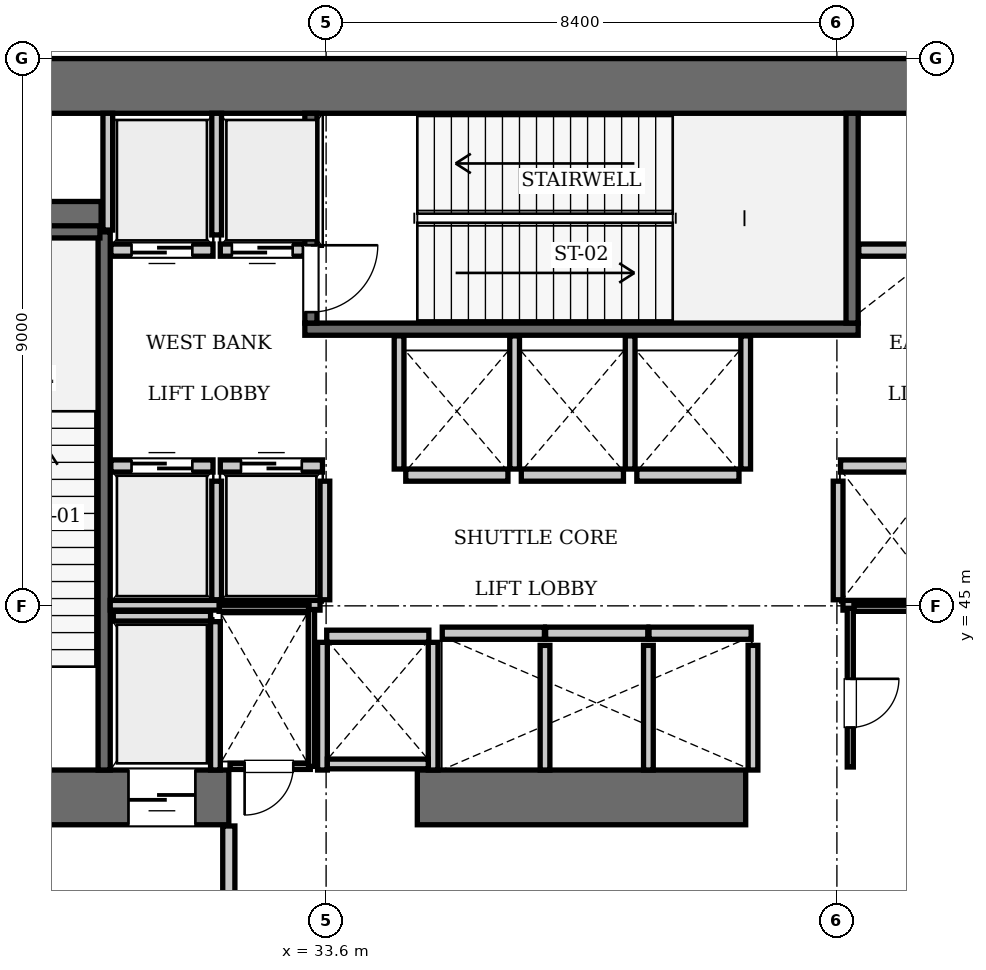
"""IFC4 building model, lengths in metres.
Left out: names, types, materials, properties, quantities, classifications, styles, units other than length and angle.
Written with IfcOpenShell. Run it as: python <this file> out.ifc"""

import sys

from ifc_helpers import new_model, si_unit, direction, frame, frame_2d, origin, place, context, subcontext, project, spatial, rectangle, extrude, element, fill, save


model = new_model("IFC4")
c1 = context("Model", 3, precision=1e-05, world=origin(), true_north=direction((0.0, 1.0)))
c2 = subcontext(c1, "Body", "Model", "MODEL_VIEW")
j1 = project(units=[si_unit("LENGTHUNIT", "METRE"), si_unit("PLANEANGLEUNIT", "RADIAN")], contexts=[c1])
p1 = place(None, origin())
s1 = spatial("IfcSite", under=j1, at=p1, CompositionType="ELEMENT")
p2 = place(p1, origin())
s2 = spatial("IfcBuilding", under=s1, at=p2, CompositionType="ELEMENT")
p3 = place(p2, frame((0.0, 0.0, 21.35)))
s3 = spatial("IfcBuildingStorey", under=s2, at=p3, CompositionType="ELEMENT", Elevation=21.35)
p4 = place(p3, frame((25.2, 53.55, 0.0), z_axis=(0.0, 0.0, 1.0), x_axis=(1.0, 0.0, 0.0)))
e1 = element("IfcWall", 1, at=p4, inside=s3, PredefinedType="SHEAR", context=c2, shape_type="SweptSolid", body=[
    extrude(rectangle(XDim=25.2, YDim=0.9, at=frame_2d((12.6, 0.0))), origin(), (0.0, 0.0, 1.0), 5.6),
])
p5 = place(p3, frame((25.2, 41.85, 0.0), z_axis=(0.0, 0.0, 1.0), x_axis=(1.0, 0.0, 0.0)))
e2 = element("IfcWall", 2, at=p5, inside=s3, PredefinedType="SHEAR", context=c2, shape_type="SweptSolid", body=[
    extrude(rectangle(XDim=6.8, YDim=0.9, at=frame_2d((3.4, 0.0))), origin(), (0.0, 0.0, 1.0), 5.6),
])
p6 = place(p5, frame((1.65, 0.0, 0.0)))
e3 = element("IfcOpeningElement", 3, at=p6, cuts=e2, PredefinedType="OPENING", context=c2, shape_type="SweptSolid", body=[
    extrude(rectangle(XDim=1.15, YDim=2.15, at=frame_2d((0.575, 1.075))), frame((0.0, 0.46, 0.0), z_axis=(0.0, -1.0, 0.0), x_axis=(1.0, 0.0, 0.0)), (0.0, 0.0, 1.0), 0.92),
])
p7 = place(p5, frame((5.15, 0.0, 0.0)))
e4 = element("IfcOpeningElement", 4, at=p7, cuts=e2, PredefinedType="OPENING", context=c2, shape_type="SweptSolid", body=[
    extrude(rectangle(XDim=1.1, YDim=2.2, at=frame_2d((0.55, 1.1))), frame((0.0, 0.46, 0.0), z_axis=(0.0, -1.0, 0.0), x_axis=(1.0, 0.0, 0.0)), (0.0, 0.0, 1.0), 0.92),
])
p8 = place(p3, frame((35.1, 41.85, 0.0), z_axis=(0.0, 0.0, 1.0), x_axis=(1.0, 0.0, 0.0)))
e5 = element("IfcWall", 5, at=p8, inside=s3, PredefinedType="SHEAR", context=c2, shape_type="SweptSolid", body=[
    extrude(rectangle(XDim=5.4, YDim=0.9, at=frame_2d((2.7, 0.0))), origin(), (0.0, 0.0, 1.0), 5.6),
])
p9 = place(p3, frame((26.1, 51.4, 0.0), z_axis=(0.0, 0.0, 1.0), x_axis=(1.0, 0.0, 0.0)))
e6 = element("IfcWall", 6, at=p9, inside=s3, PredefinedType="SHEAR", context=c2, shape_type="SweptSolid", body=[
    extrude(rectangle(XDim=3.8, YDim=0.5, at=frame_2d((1.9, 0.0))), origin(), (0.0, 0.0, 1.0), 5.6),
])
p10 = place(p3, frame((29.95, 42.3, 0.0), z_axis=(0.0, 0.0, 1.0), x_axis=(0.0, 1.0, 0.0)))
e7 = element("IfcWall", 7, at=p10, inside=s3, PredefinedType="SOLIDWALL", context=c2, shape_type="SweptSolid", body=[
    extrude(rectangle(XDim=8.85, YDim=0.2, at=frame_2d((4.425, 0.0))), origin(), (0.0, 0.0, 1.0), 5.36),
])
p11 = place(p3, frame((26.38, 51.15, 0.0), z_axis=(0.0, 0.0, 1.0), x_axis=(1.0, 0.0, 0.0)))
e8 = element("IfcWall", 8, at=p11, inside=s3, PredefinedType="SOLIDWALL", context=c2, shape_type="SweptSolid", body=[
    extrude(rectangle(XDim=3.5, YDim=0.2, at=frame_2d((1.75, 0.0))), origin(), (0.0, 0.0, 1.0), 5.36),
])
p12 = place(p3, frame((33.25, 49.55, 0.0), z_axis=(0.0, 0.0, 1.0), x_axis=(1.0, 0.0, 0.0)))
e9 = element("IfcWall", 9, at=p12, inside=s3, PredefinedType="SOLIDWALL", context=c2, shape_type="SweptSolid", body=[
    extrude(rectangle(XDim=9.1, YDim=0.2, at=frame_2d((4.55, 0.0))), origin(), (0.0, 0.0, 1.0), 5.36),
])
p13 = place(p3, frame((42.25, 49.65, 0.0), z_axis=(0.0, 0.0, 1.0), x_axis=(0.0, 1.0, 0.0)))
e10 = element("IfcWall", 10, at=p13, inside=s3, PredefinedType="SOLIDWALL", context=c2, shape_type="SweptSolid", body=[
    extrude(rectangle(XDim=3.45, YDim=0.2, at=frame_2d((1.725, 0.0))), origin(), (0.0, 0.0, 1.0), 5.36),
])
p14 = place(p3, frame((33.35, 49.65, 0.0), z_axis=(0.0, 0.0, 1.0), x_axis=(0.0, 1.0, 0.0)))
e11 = element("IfcWall", 11, at=p14, inside=s3, PredefinedType="SOLIDWALL", context=c2, shape_type="SweptSolid", body=[
    extrude(rectangle(XDim=3.45, YDim=0.2, at=frame_2d((1.725, 0.0))), origin(), (0.0, 0.0, 1.0), 5.36),
])
p15 = place(p14, frame((0.18, 0.0, 0.0)))
e12 = element("IfcOpeningElement", 12, at=p15, cuts=e11, PredefinedType="OPENING", context=c2, shape_type="SweptSolid", body=[
    extrude(rectangle(XDim=1.1, YDim=2.15, at=frame_2d((0.55, 1.075))), frame((0.0, 0.11, 0.0), z_axis=(0.0, -1.0, 0.0), x_axis=(1.0, 0.0, 0.0)), (0.0, 0.0, 1.0), 0.22),
])
p16 = place(p3, frame((30.06, 47.3, 0.0), z_axis=(0.0, 0.0, 1.0), x_axis=(1.0, 0.0, 0.0)))
e13 = element("IfcWall", 13, at=p16, inside=s3, PredefinedType="SOLIDWALL", context=c2, shape_type="SweptSolid", body=[
    extrude(rectangle(XDim=1.68, YDim=0.2, at=frame_2d((0.84, 0.0))), origin(), (0.0, 0.0, 1.0), 5.36),
])
p17 = place(p16, frame((0.34, 0.0, 0.0)))
e14 = element("IfcOpeningElement", 14, at=p17, cuts=e13, PredefinedType="OPENING", context=c2, shape_type="SweptSolid", body=[
    extrude(rectangle(XDim=1.0, YDim=2.15, at=frame_2d((0.5, 1.075))), frame((0.0, 0.11, 0.0), z_axis=(0.0, -1.0, 0.0), x_axis=(1.0, 0.0, 0.0)), (0.0, 0.0, 1.0), 0.22),
])
p18 = place(p3, frame((31.86, 47.3, 0.0), z_axis=(0.0, 0.0, 1.0), x_axis=(1.0, 0.0, 0.0)))
e15 = element("IfcWall", 15, at=p18, inside=s3, PredefinedType="SOLIDWALL", context=c2, shape_type="SweptSolid", body=[
    extrude(rectangle(XDim=1.68, YDim=0.2, at=frame_2d((0.84, 0.0))), origin(), (0.0, 0.0, 1.0), 5.36),
])
p19 = place(p18, frame((0.34, 0.0, 0.0)))
e16 = element("IfcOpeningElement", 16, at=p19, cuts=e15, PredefinedType="OPENING", context=c2, shape_type="SweptSolid", body=[
    extrude(rectangle(XDim=1.0, YDim=2.15, at=frame_2d((0.5, 1.075))), frame((0.0, 0.11, 0.0), z_axis=(0.0, -1.0, 0.0), x_axis=(1.0, 0.0, 0.0)), (0.0, 0.0, 1.0), 0.22),
])
p20 = place(p3, frame((30.06, 50.85, 0.0), z_axis=(0.0, 0.0, 1.0), x_axis=(1.0, 0.0, 0.0)))
e17 = element("IfcWall", 17, at=p20, inside=s3, PredefinedType="SOLIDWALL", context=c2, shape_type="SweptSolid", body=[
    extrude(rectangle(XDim=1.68, YDim=0.2, at=frame_2d((0.84, 0.0))), origin(), (0.0, 0.0, 1.0), 5.36),
])
p21 = place(p20, frame((0.34, 0.0, 0.0)))
e18 = element("IfcOpeningElement", 18, at=p21, cuts=e17, PredefinedType="OPENING", context=c2, shape_type="SweptSolid", body=[
    extrude(rectangle(XDim=1.0, YDim=2.15, at=frame_2d((0.5, 1.075))), frame((0.0, 0.11, 0.0), z_axis=(0.0, -1.0, 0.0), x_axis=(1.0, 0.0, 0.0)), (0.0, 0.0, 1.0), 0.22),
])
p22 = place(p3, frame((31.86, 50.85, 0.0), z_axis=(0.0, 0.0, 1.0), x_axis=(1.0, 0.0, 0.0)))
e19 = element("IfcWall", 19, at=p22, inside=s3, PredefinedType="SOLIDWALL", context=c2, shape_type="SweptSolid", body=[
    extrude(rectangle(XDim=1.38, YDim=0.2, at=frame_2d((0.69, 0.0))), origin(), (0.0, 0.0, 1.0), 5.36),
])
p23 = place(p22, frame((0.19, 0.0, 0.0)))
e20 = element("IfcOpeningElement", 20, at=p23, cuts=e19, PredefinedType="OPENING", context=c2, shape_type="SweptSolid", body=[
    extrude(rectangle(XDim=1.0, YDim=2.15, at=frame_2d((0.5, 1.075))), frame((0.0, 0.11, 0.0), z_axis=(0.0, -1.0, 0.0), x_axis=(1.0, 0.0, 0.0)), (0.0, 0.0, 1.0), 0.22),
])
p24 = place(p3, frame((42.06, 47.3, 0.0), z_axis=(0.0, 0.0, 1.0), x_axis=(1.0, 0.0, 0.0)))
e21 = element("IfcWall", 21, at=p24, inside=s3, PredefinedType="SOLIDWALL", context=c2, shape_type="SweptSolid", body=[
    extrude(rectangle(XDim=1.68, YDim=0.2, at=frame_2d((0.84, 0.0))), origin(), (0.0, 0.0, 1.0), 5.36),
])
p25 = place(p3, frame((42.36, 50.85, 0.0), z_axis=(0.0, 0.0, 1.0), x_axis=(1.0, 0.0, 0.0)))
e22 = element("IfcWall", 22, at=p25, inside=s3, PredefinedType="SOLIDWALL", context=c2, shape_type="SweptSolid", body=[
    extrude(rectangle(XDim=1.38, YDim=0.2, at=frame_2d((0.69, 0.0))), origin(), (0.0, 0.0, 1.0), 5.36),
])
for number, where, z_axis, x_axis in (
    (23, (35.51, 44.55, 0.0), (0.0, 0.0, 1.0), (1.0, 0.0, 0.0)),
    (24, (37.21, 44.55, 0.0), (0.0, 0.0, 1.0), (1.0, 0.0, 0.0)),
):
    element("IfcWall", number, at=place(p3, frame(where, z_axis=z_axis, x_axis=x_axis)), inside=s3, PredefinedType="SOLIDWALL", context=c2, shape_type="SweptSolid", body=[
        extrude(rectangle(XDim=1.68, YDim=0.2, at=frame_2d((0.84, 0.0))), origin(), (0.0, 0.0, 1.0), 5.36),
    ])
for number, where, z_axis, x_axis in (
    (25, (38.91, 44.55, 0.0), (0.0, 0.0, 1.0), (1.0, 0.0, 0.0)),
    (26, (34.91, 47.15, 0.0), (0.0, 0.0, 1.0), (1.0, 0.0, 0.0)),
):
    element("IfcWall", number, at=place(p3, frame(where, z_axis=z_axis, x_axis=x_axis)), inside=s3, PredefinedType="SOLIDWALL", context=c2, shape_type="SweptSolid", body=[
        extrude(rectangle(XDim=1.68, YDim=0.2, at=frame_2d((0.84, 0.0))), origin(), (0.0, 0.0, 1.0), 5.36),
    ])
for number, where, z_axis, x_axis in (
    (27, (36.81, 47.15, 0.0), (0.0, 0.0, 1.0), (1.0, 0.0, 0.0)),
    (28, (38.71, 47.15, 0.0), (0.0, 0.0, 1.0), (1.0, 0.0, 0.0)),
    (29, (33.61, 44.5, 0.0), (0.0, 0.0, 1.0), (1.0, 0.0, 0.0)),
):
    element("IfcWall", number, at=place(p3, frame(where, z_axis=z_axis, x_axis=x_axis)), inside=s3, PredefinedType="SOLIDWALL", context=c2, shape_type="SweptSolid", body=[
        extrude(rectangle(XDim=1.68, YDim=0.2, at=frame_2d((0.84, 0.0))), origin(), (0.0, 0.0, 1.0), 5.36),
    ])
p26 = place(p3, frame((30.1, 44.83, 0.0), z_axis=(0.0, 0.0, 1.0), x_axis=(1.0, 0.0, 0.0)))
e30 = element("IfcWall", 30, at=p26, inside=s3, PredefinedType="SOLIDWALL", context=c2, shape_type="SweptSolid", body=[
    extrude(rectangle(XDim=1.6, YDim=0.16, at=frame_2d((0.8, 0.0))), origin(), (0.0, 0.0, 1.0), 5.36),
])
p27 = place(p3, frame((31.78, 42.3, 0.0), z_axis=(0.0, 0.0, 1.0), x_axis=(0.0, 1.0, 0.0)))
e31 = element("IfcWall", 31, at=p27, inside=s3, PredefinedType="SOLIDWALL", context=c2, shape_type="SweptSolid", body=[
    extrude(rectangle(XDim=2.44, YDim=0.16, at=frame_2d((1.22, 0.0))), origin(), (0.0, 0.0, 1.0), 5.36),
])
for number, where, z_axis, x_axis in (
    (32, (31.8, 45.1, 0.0), (0.0, 0.0, 1.0), (0.0, 1.0, 0.0)),
    (33, (33.58, 45.1, 0.0), (0.0, 0.0, 1.0), (0.0, 1.0, 0.0)),
):
    element("IfcWall", number, at=place(p3, frame(where, z_axis=z_axis, x_axis=x_axis)), inside=s3, PredefinedType="SOLIDWALL", context=c2, shape_type="SweptSolid", body=[
        extrude(rectangle(XDim=1.95, YDim=0.16, at=frame_2d((0.975, 0.0))), origin(), (0.0, 0.0, 1.0), 5.36),
    ])
p28 = place(p3, frame((30.05, 45.01, 0.0), z_axis=(0.0, 0.0, 1.0), x_axis=(1.0, 0.0, 0.0)))
e34 = element("IfcWall", 34, at=p28, inside=s3, PredefinedType="SOLIDWALL", context=c2, shape_type="SweptSolid", body=[
    extrude(rectangle(XDim=3.45, YDim=0.16, at=frame_2d((1.725, 0.0))), origin(), (0.0, 0.0, 1.0), 5.36),
])
p29 = place(p3, frame((30.01, 51.18, 0.0), z_axis=(0.0, 0.0, 1.0), x_axis=(0.0, 1.0, 0.0)))
e35 = element("IfcWall", 35, at=p29, inside=s3, PredefinedType="SOLIDWALL", context=c2, shape_type="SweptSolid", body=[
    extrude(rectangle(XDim=1.92, YDim=0.16, at=frame_2d((0.96, 0.0))), origin(), (0.0, 0.0, 1.0), 5.36),
])
p30 = place(p3, frame((31.8, 51.1, 0.0), z_axis=(0.0, 0.0, 1.0), x_axis=(0.0, 1.0, 0.0)))
e36 = element("IfcWall", 36, at=p30, inside=s3, PredefinedType="SOLIDWALL", context=c2, shape_type="SweptSolid", body=[
    extrude(rectangle(XDim=2.0, YDim=0.16, at=frame_2d((1.0, 0.0))), origin(), (0.0, 0.0, 1.0), 5.36),
])
p31 = place(p3, frame((42.02, 45.1, 0.0), z_axis=(0.0, 0.0, 1.0), x_axis=(0.0, 1.0, 0.0)))
e37 = element("IfcWall", 37, at=p31, inside=s3, PredefinedType="SOLIDWALL", context=c2, shape_type="SweptSolid", body=[
    extrude(rectangle(XDim=1.95, YDim=0.16, at=frame_2d((0.975, 0.0))), origin(), (0.0, 0.0, 1.0), 5.36),
])
p32 = place(p3, frame((42.1, 45.01, 0.0), z_axis=(0.0, 0.0, 1.0), x_axis=(1.0, 0.0, 0.0)))
e38 = element("IfcWall", 38, at=p32, inside=s3, PredefinedType="SOLIDWALL", context=c2, shape_type="SweptSolid", body=[
    extrude(rectangle(XDim=3.45, YDim=0.16, at=frame_2d((1.725, 0.0))), origin(), (0.0, 0.0, 1.0), 5.36),
])
for number, where, z_axis, x_axis in (
    (39, (37.2, 42.3, 0.0), (0.0, 0.0, 1.0), (0.0, 1.0, 0.0)),
    (40, (38.9, 42.3, 0.0), (0.0, 0.0, 1.0), (0.0, 1.0, 0.0)),
    (41, (40.62, 42.3, 0.0), (0.0, 0.0, 1.0), (0.0, 1.0, 0.0)),
):
    element("IfcWall", number, at=place(p3, frame(where, z_axis=z_axis, x_axis=x_axis)), inside=s3, PredefinedType="SOLIDWALL", context=c2, shape_type="SweptSolid", body=[
        extrude(rectangle(XDim=2.05, YDim=0.16, at=frame_2d((1.025, 0.0))), origin(), (0.0, 0.0, 1.0), 5.36),
    ])
for number, where, z_axis, x_axis in (
    (42, (34.8, 47.25, 0.0), (0.0, 0.0, 1.0), (0.0, 1.0, 0.0)),
    (43, (36.7, 47.25, 0.0), (0.0, 0.0, 1.0), (0.0, 1.0, 0.0)),
    (44, (38.6, 47.25, 0.0), (0.0, 0.0, 1.0), (0.0, 1.0, 0.0)),
    (45, (40.5, 47.25, 0.0), (0.0, 0.0, 1.0), (0.0, 1.0, 0.0)),
):
    element("IfcWall", number, at=place(p3, frame(where, z_axis=z_axis, x_axis=x_axis)), inside=s3, PredefinedType="SOLIDWALL", context=c2, shape_type="SweptSolid", body=[
        extrude(rectangle(XDim=2.19, YDim=0.16, at=frame_2d((1.095, 0.0))), origin(), (0.0, 0.0, 1.0), 5.36),
    ])
for number, where, z_axis, x_axis in (
    (46, (33.54, 42.3, 0.0), (0.0, 0.0, 1.0), (0.0, 1.0, 0.0)),
    (47, (35.36, 42.3, 0.0), (0.0, 0.0, 1.0), (0.0, 1.0, 0.0)),
):
    element("IfcWall", number, at=place(p3, frame(where, z_axis=z_axis, x_axis=x_axis)), inside=s3, PredefinedType="SOLIDWALL", context=c2, shape_type="SweptSolid", body=[
        extrude(rectangle(XDim=2.1, YDim=0.16, at=frame_2d((1.05, 0.0))), origin(), (0.0, 0.0, 1.0), 5.36),
    ])
p33 = place(p3, frame((33.62, 42.4, 0.0), z_axis=(0.0, 0.0, 1.0), x_axis=(1.0, 0.0, 0.0)))
e48 = element("IfcWall", 48, at=p33, inside=s3, PredefinedType="SOLIDWALL", context=c2, shape_type="SweptSolid", body=[
    extrude(rectangle(XDim=1.66, YDim=0.16, at=frame_2d((0.83, 0.0))), origin(), (0.0, 0.0, 1.0), 5.36),
])
p34 = place(p3, frame((32.0, 38.31, 0.0), z_axis=(0.0, 0.0, 1.0), x_axis=(0.0, 1.0, 0.0)))
e49 = element("IfcWall", 49, at=p34, inside=s3, PredefinedType="PARTITIONING", context=c2, shape_type="SweptSolid", body=[
    extrude(rectangle(XDim=3.07, YDim=0.2, at=frame_2d((1.535, 0.0))), origin(), (0.0, 0.0, 1.0), 5.36),
])
p35 = place(p3, frame((32.02, 42.36, 0.0), z_axis=(0.0, 0.0, 1.0), x_axis=(1.0, 0.0, 0.0)))
e50 = element("IfcWall", 50, at=p35, inside=s3, PredefinedType="PARTITIONING", context=c2, shape_type="SweptSolid", body=[
    extrude(rectangle(XDim=1.32, YDim=0.1, at=frame_2d((0.66, 0.0))), origin(), (0.0, 0.0, 1.0), 5.36),
])
p36 = place(p35, frame((0.24, 0.0, 0.0)))
e51 = element("IfcOpeningElement", 51, at=p36, cuts=e50, PredefinedType="OPENING", context=c2, shape_type="SweptSolid", body=[
    extrude(rectangle(XDim=0.8, YDim=2.05, at=frame_2d((0.4, 1.025))), frame((0.0, 0.06, 0.0), z_axis=(0.0, -1.0, 0.0), x_axis=(1.0, 0.0, 0.0)), (0.0, 0.0, 1.0), 0.12),
])
p37 = place(p3, frame((31.84, 44.96, 0.0), z_axis=(0.0, 0.0, 1.0), x_axis=(1.0, 0.0, 0.0)))
e52 = element("IfcWall", 52, at=p37, inside=s3, PredefinedType="PARTITIONING", context=c2, shape_type="SweptSolid", body=[
    extrude(rectangle(XDim=1.48, YDim=0.1, at=frame_2d((0.74, 0.0))), origin(), (0.0, 0.0, 1.0), 5.36),
])
p38 = place(p3, frame((33.36, 42.36, 0.0), z_axis=(0.0, 0.0, 1.0), x_axis=(0.0, 1.0, 0.0)))
e53 = element("IfcWall", 53, at=p38, inside=s3, PredefinedType="PARTITIONING", context=c2, shape_type="SweptSolid", body=[
    extrude(rectangle(XDim=2.58, YDim=0.1, at=frame_2d((1.29, 0.0))), origin(), (0.0, 0.0, 1.0), 5.36),
])
p39 = place(p3, frame((42.22, 42.35, 0.0), z_axis=(0.0, 0.0, 1.0), x_axis=(0.0, 1.0, 0.0)))
e54 = element("IfcWall", 54, at=p39, inside=s3, PredefinedType="PARTITIONING", context=c2, shape_type="SweptSolid", body=[
    extrude(rectangle(XDim=2.61, YDim=0.1, at=frame_2d((1.305, 0.0))), origin(), (0.0, 0.0, 1.0), 5.36),
])
p40 = place(p39, frame((0.65, 0.0, 0.0)))
e55 = element("IfcOpeningElement", 55, at=p40, cuts=e54, PredefinedType="OPENING", context=c2, shape_type="SweptSolid", body=[
    extrude(rectangle(XDim=0.8, YDim=2.05, at=frame_2d((0.4, 1.025))), frame((0.0, 0.06, 0.0), z_axis=(0.0, -1.0, 0.0), x_axis=(1.0, 0.0, 0.0)), (0.0, 0.0, 1.0), 0.12),
])
p41 = place(p3, frame((42.28, 44.96, 0.0), z_axis=(0.0, 0.0, 1.0), x_axis=(1.0, 0.0, 0.0)))
e56 = element("IfcWall", 56, at=p41, inside=s3, PredefinedType="PARTITIONING", context=c2, shape_type="SweptSolid", body=[
    extrude(rectangle(XDim=1.3, YDim=0.1, at=frame_2d((0.65, 0.0))), origin(), (0.0, 0.0, 1.0), 5.36),
])
p42 = place(p15, frame((1.1, 0.0, 0.0), z_axis=(0.0, 0.0, 1.0), x_axis=(-1.0, 0.0, 0.0)))
e57 = element("IfcDoor", 57, at=p42, inside=s3, OperationType="SINGLE_SWING_LEFT", PredefinedType="DOOR", context=c2, shape_type="SweptSolid", body=[
    extrude(rectangle(XDim=1.1, YDim=2.15, at=frame_2d((0.55, 1.075))), frame((0.0, 0.025, 0.0), z_axis=(0.0, -1.0, 0.0), x_axis=(1.0, 0.0, 0.0)), (0.0, 0.0, 1.0), 0.05),
])
fill(e12, e57)
p43 = place(p17, origin())
e58 = element("IfcDoor", 58, at=p43, inside=s3, OperationType="SLIDING_TO_LEFT", PredefinedType="DOOR", context=c2, shape_type="SweptSolid", body=[
    extrude(rectangle(XDim=1.0, YDim=2.15, at=frame_2d((0.5, 1.075))), frame((0.0, 0.025, 0.0), z_axis=(0.0, -1.0, 0.0), x_axis=(1.0, 0.0, 0.0)), (0.0, 0.0, 1.0), 0.05),
])
fill(e14, e58)
p44 = place(p19, origin())
e59 = element("IfcDoor", 59, at=p44, inside=s3, OperationType="SLIDING_TO_LEFT", PredefinedType="DOOR", context=c2, shape_type="SweptSolid", body=[
    extrude(rectangle(XDim=1.0, YDim=2.15, at=frame_2d((0.5, 1.075))), frame((0.0, 0.025, 0.0), z_axis=(0.0, -1.0, 0.0), x_axis=(1.0, 0.0, 0.0)), (0.0, 0.0, 1.0), 0.05),
])
fill(e16, e59)
p45 = place(p21, frame((1.0, 0.0, 0.0), z_axis=(0.0, 0.0, 1.0), x_axis=(-1.0, 0.0, 0.0)))
e60 = element("IfcDoor", 60, at=p45, inside=s3, OperationType="SLIDING_TO_LEFT", PredefinedType="DOOR", context=c2, shape_type="SweptSolid", body=[
    extrude(rectangle(XDim=1.0, YDim=2.15, at=frame_2d((0.5, 1.075))), frame((0.0, 0.025, 0.0), z_axis=(0.0, -1.0, 0.0), x_axis=(1.0, 0.0, 0.0)), (0.0, 0.0, 1.0), 0.05),
])
fill(e18, e60)
p46 = place(p23, frame((1.0, 0.0, 0.0), z_axis=(0.0, 0.0, 1.0), x_axis=(-1.0, 0.0, 0.0)))
e61 = element("IfcDoor", 61, at=p46, inside=s3, OperationType="SLIDING_TO_LEFT", PredefinedType="DOOR", context=c2, shape_type="SweptSolid", body=[
    extrude(rectangle(XDim=1.0, YDim=2.15, at=frame_2d((0.5, 1.075))), frame((0.0, 0.025, 0.0), z_axis=(0.0, -1.0, 0.0), x_axis=(1.0, 0.0, 0.0)), (0.0, 0.0, 1.0), 0.05),
])
fill(e20, e61)
p47 = place(p7, frame((1.1, 0.0, 0.0), z_axis=(0.0, 0.0, 1.0), x_axis=(-1.0, 0.0, 0.0)))
e62 = element("IfcDoor", 62, at=p47, inside=s3, OperationType="SLIDING_TO_LEFT", PredefinedType="DOOR", context=c2, shape_type="SweptSolid", body=[
    extrude(rectangle(XDim=1.1, YDim=2.2, at=frame_2d((0.55, 1.1))), frame((0.0, 0.025, 0.0), z_axis=(0.0, -1.0, 0.0), x_axis=(1.0, 0.0, 0.0)), (0.0, 0.0, 1.0), 0.05),
])
fill(e4, e62)
p48 = place(p36, frame((0.8, 0.0, 0.0), z_axis=(0.0, 0.0, 1.0), x_axis=(-1.0, 0.0, 0.0)))
e63 = element("IfcDoor", 63, at=p48, inside=s3, OperationType="SINGLE_SWING_RIGHT", PredefinedType="DOOR", context=c2, shape_type="SweptSolid", body=[
    extrude(rectangle(XDim=0.8, YDim=2.05, at=frame_2d((0.4, 1.025))), frame((0.0, 0.025, 0.0), z_axis=(0.0, -1.0, 0.0), x_axis=(1.0, 0.0, 0.0)), (0.0, 0.0, 1.0), 0.05),
])
fill(e51, e63)
p49 = place(p40, frame((0.8, 0.0, 0.0), z_axis=(0.0, 0.0, 1.0), x_axis=(-1.0, 0.0, 0.0)))
e64 = element("IfcDoor", 64, at=p49, inside=s3, OperationType="SINGLE_SWING_LEFT", PredefinedType="DOOR", context=c2, shape_type="SweptSolid", body=[
    extrude(rectangle(XDim=0.8, YDim=2.05, at=frame_2d((0.4, 1.025))), frame((0.0, 0.025, 0.0), z_axis=(0.0, -1.0, 0.0), x_axis=(1.0, 0.0, 0.0)), (0.0, 0.0, 1.0), 0.05),
])
fill(e55, e64)
save(model, sys.argv[1])
